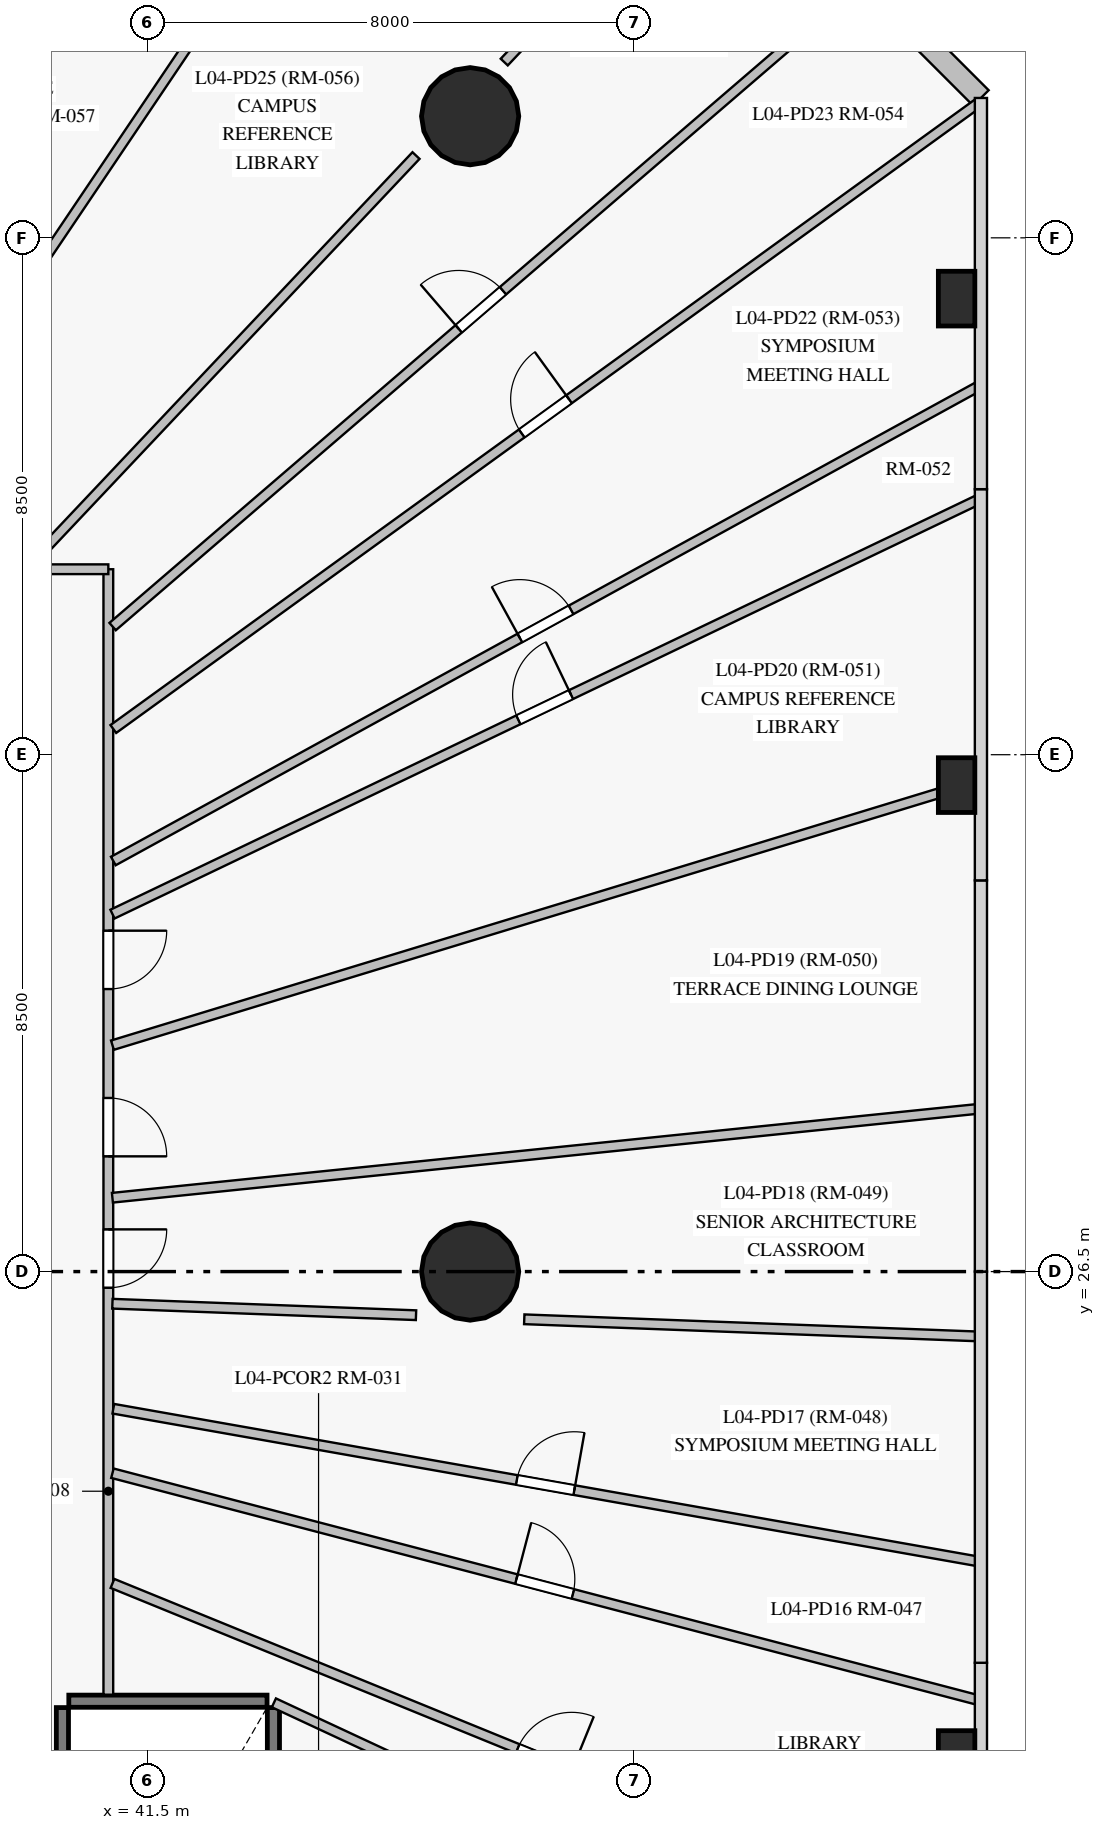
"""IFC4 building model, lengths in metres.
Left out: names, types, materials, properties, quantities, classifications, styles, units other than length and angle.
Written with IfcOpenShell. Run it as: python <this file> out.ifc"""

import sys

from ifc_helpers import new_model, si_unit, direction, frame, frame_2d, origin, origin_with_axes, origin_2d, place, context, subcontext, project, spatial, rectangle, circle, extrude, source, transform, mapped, element, fill, save


model = new_model("IFC4")
c1 = context("Model", 3, precision=1e-05, world=origin(), true_north=direction((0.0, 1.0)))
c2 = subcontext(c1, "Body", "Model", "MODEL_VIEW")
j1 = project(units=[si_unit("LENGTHUNIT", "METRE"), si_unit("PLANEANGLEUNIT", "RADIAN")], contexts=[c1])
p1 = place(None, origin())
s1 = spatial("IfcSite", under=j1, at=p1, CompositionType="ELEMENT")
p2 = place(p1, origin())
s2 = spatial("IfcBuilding", under=s1, at=p2, CompositionType="ELEMENT")
p3 = place(p2, frame((0.0, 0.0, 18.0)))
s3 = spatial("IfcBuildingStorey", under=s2, at=p3, CompositionType="ELEMENT", Elevation=18.0)
m1 = source(origin_with_axes(), c2, "Body", "SweptSolid", [
    extrude(circle(Radius=0.8, at=origin_2d()), origin(), (0.0, 0.0, 1.0), 4.5),
])
for number, where, z_axis, x_axis in (
    (1, (46.8, 26.5, 0.0), (0.0, 0.0, 1.0), (1.0, 0.0, 0.0)),
    (2, (46.8, 45.5, 0.0), (0.0, 0.0, 1.0), (1.0, 0.0, 0.0)),
):
    element("IfcColumn", number, at=place(p3, frame(where, z_axis=z_axis, x_axis=x_axis)), inside=s3, PredefinedType="COLUMN", context=c2, shape_type="MappedRepresentation", body=[
        mapped(m1, transform((0.0, 0.0, 0.0), scale=1.0)),
    ])
m2 = source(origin_with_axes(), c2, "Body", "SweptSolid", [
    extrude(rectangle(XDim=0.6, YDim=0.9, at=origin_2d()), origin(), (0.0, 0.0, 1.0), 4.5),
])
for number, where, z_axis, x_axis in (
    (3, (54.8, 18.5, 0.0), (0.0, 0.0, 1.0), (1.0, 0.0, 0.0)),
    (4, (54.8, 34.5, 0.0), (0.0, 0.0, 1.0), (1.0, 0.0, 0.0)),
    (5, (54.8, 42.5, 0.0), (0.0, 0.0, 1.0), (1.0, 0.0, 0.0)),
):
    element("IfcColumn", number, at=place(p3, frame(where, z_axis=z_axis, x_axis=x_axis)), inside=s3, PredefinedType="PILASTER", context=c2, shape_type="MappedRepresentation", body=[
        mapped(m2, transform((0.0, 0.0, 0.0), scale=1.0)),
    ])
p4 = place(p3, frame((55.2, 45.8, 0.0), z_axis=(0.0, 0.0, 1.0), x_axis=(-0.707106781187, 0.707106781187, 0.0)))
e6 = element("IfcWall", 6, at=p4, inside=s3, PredefinedType="SOLIDWALL", context=c2, shape_type="SweptSolid", body=[
    extrude(rectangle(XDim=2.546, YDim=0.36, at=frame_2d((1.273, 0.0))), origin(), (0.0, 0.0, 1.0), 4.225),
])
p5 = place(p3, frame((40.095, 11.98, 0.0), z_axis=(0.0, 0.0, 1.0), x_axis=(0.0, 1.0, 0.0)))
e7 = element("IfcWall", 7, at=p5, inside=s3, PredefinedType="SHEAR", context=c2, shape_type="SweptSolid", body=[
    extrude(rectangle(XDim=7.35, YDim=0.2, at=frame_2d((3.675, 0.0))), origin(), (0.0, 0.0, 1.0), 4.225),
])
p6 = place(p3, frame((43.565, 11.98, 0.0), z_axis=(0.0, 0.0, 1.0), x_axis=(0.0, 1.0, 0.0)))
e8 = element("IfcWall", 8, at=p6, inside=s3, PredefinedType="SHEAR", context=c2, shape_type="SweptSolid", body=[
    extrude(rectangle(XDim=7.35, YDim=0.2, at=frame_2d((3.675, 0.0))), origin(), (0.0, 0.0, 1.0), 4.225),
])
p7 = place(p6, frame((0.35, 0.0, 0.0)))
e9 = element("IfcOpeningElement", 9, at=p7, cuts=e8, PredefinedType="OPENING", context=c2, shape_type="SweptSolid", body=[
    extrude(rectangle(XDim=1.15, YDim=2.15, at=frame_2d((0.575, 1.075))), frame((0.0, 0.11, 0.0), z_axis=(0.0, -1.0, 0.0), x_axis=(1.0, 0.0, 0.0)), (0.0, 0.0, 1.0), 0.22),
])
p8 = place(p3, frame((40.2, 19.435, 0.0), z_axis=(0.0, 0.0, 1.0), x_axis=(1.0, 0.0, 0.0)))
e10 = element("IfcWall", 10, at=p8, inside=s3, PredefinedType="SHEAR", context=c2, shape_type="SweptSolid", body=[
    extrude(rectangle(XDim=3.26, YDim=0.2, at=frame_2d((1.63, 0.0))), origin(), (0.0, 0.0, 1.0), 4.225),
])
p9 = place(p3, frame((40.85, 38.05, 0.0), z_axis=(0.0, 0.0, 1.0), x_axis=(0.0, -1.0, 0.0)))
e11 = element("IfcWall", 11, at=p9, inside=s3, PredefinedType="PARTITIONING", context=c2, shape_type="SweptSolid", body=[
    extrude(rectangle(XDim=18.508, YDim=0.16, at=frame_2d((9.254, 0.0))), origin(), (0.0, 0.0, 1.0), 2.725),
])
p10 = place(p9, frame((10.856, 0.0, 0.0)))
e12 = element("IfcOpeningElement", 12, at=p10, cuts=e11, PredefinedType="OPENING", context=c2, shape_type="SweptSolid", body=[
    extrude(rectangle(XDim=0.96, YDim=2.15, at=frame_2d((0.48, 1.075))), frame((0.0, 0.09, 0.0), z_axis=(0.0, -1.0, 0.0), x_axis=(1.0, 0.0, 0.0)), (0.0, 0.0, 1.0), 0.18),
])
p11 = place(p9, frame((8.695, 0.0, 0.0)))
e13 = element("IfcOpeningElement", 13, at=p11, cuts=e11, PredefinedType="OPENING", context=c2, shape_type="SweptSolid", body=[
    extrude(rectangle(XDim=0.96, YDim=2.15, at=frame_2d((0.48, 1.075))), frame((0.0, 0.09, 0.0), z_axis=(0.0, -1.0, 0.0), x_axis=(1.0, 0.0, 0.0)), (0.0, 0.0, 1.0), 0.18),
])
p12 = place(p9, frame((5.944, 0.0, 0.0)))
e14 = element("IfcOpeningElement", 14, at=p12, cuts=e11, PredefinedType="OPENING", context=c2, shape_type="SweptSolid", body=[
    extrude(rectangle(XDim=0.96, YDim=2.15, at=frame_2d((0.48, 1.075))), frame((0.0, 0.09, 0.0), z_axis=(0.0, -1.0, 0.0), x_axis=(1.0, 0.0, 0.0)), (0.0, 0.0, 1.0), 0.18),
])
p13 = place(p3, frame((40.932, 35.423, 0.0), z_axis=(0.0, 0.0, 1.0), x_axis=(0.810128766866, 0.586251977477, 0.0)))
e15 = element("IfcWall", 15, at=p13, inside=s3, PredefinedType="PARTITIONING", context=c2, shape_type="SweptSolid", body=[
    extrude(rectangle(XDim=17.566, YDim=0.16, at=frame_2d((8.783, 0.0))), origin(), (0.0, 0.0, 1.0), 4.225),
])
p14 = place(p13, frame((8.291, 0.0, 0.0)))
e16 = element("IfcOpeningElement", 16, at=p14, cuts=e15, PredefinedType="OPENING", context=c2, shape_type="SweptSolid", body=[
    extrude(rectangle(XDim=0.96, YDim=2.15, at=frame_2d((0.48, 1.075))), frame((0.0, 0.09, 0.0), z_axis=(0.0, -1.0, 0.0), x_axis=(1.0, 0.0, 0.0)), (0.0, 0.0, 1.0), 0.18),
])
p15 = place(p3, frame((40.932, 33.252, 0.0), z_axis=(0.0, 0.0, 1.0), x_axis=(0.876735097535, 0.480973563463, 0.0)))
e17 = element("IfcWall", 17, at=p15, inside=s3, PredefinedType="PARTITIONING", context=c2, shape_type="SweptSolid", body=[
    extrude(rectangle(XDim=16.237, YDim=0.16, at=frame_2d((8.118, 0.0))), origin(), (0.0, 0.0, 1.0), 4.225),
])
p16 = place(p15, frame((7.626, 0.0, 0.0)))
e18 = element("IfcOpeningElement", 18, at=p16, cuts=e17, PredefinedType="OPENING", context=c2, shape_type="SweptSolid", body=[
    extrude(rectangle(XDim=0.96, YDim=2.15, at=frame_2d((0.48, 1.075))), frame((0.0, 0.09, 0.0), z_axis=(0.0, -1.0, 0.0), x_axis=(1.0, 0.0, 0.0)), (0.0, 0.0, 1.0), 0.18),
])
p17 = place(p3, frame((40.921, 37.107, 0.0), z_axis=(0.0, 0.0, 1.0), x_axis=(0.758049080964, 0.65219750908, 0.0)))
e19 = element("IfcWall", 19, at=p17, inside=s3, PredefinedType="PARTITIONING", context=c2, shape_type="SweptSolid", body=[
    extrude(rectangle(XDim=16.016, YDim=0.16, at=frame_2d((8.008, 0.0))), origin(), (0.0, 0.0, 1.0), 2.725),
])
p18 = place(p17, frame((7.508, 0.0, 0.0)))
e20 = element("IfcOpeningElement", 20, at=p18, cuts=e19, PredefinedType="OPENING", context=c2, shape_type="SweptSolid", body=[
    extrude(rectangle(XDim=0.96, YDim=2.15, at=frame_2d((0.48, 1.075))), frame((0.0, 0.09, 0.0), z_axis=(0.0, -1.0, 0.0), x_axis=(1.0, 0.0, 0.0)), (0.0, 0.0, 1.0), 0.18),
])
p19 = place(p3, frame((40.918, 32.378, 0.0), z_axis=(0.0, 0.0, 1.0), x_axis=(0.901975422738, 0.431787374499, 0.0)))
e21 = element("IfcWall", 21, at=p19, inside=s3, PredefinedType="PARTITIONING", context=c2, shape_type="SweptSolid", body=[
    extrude(rectangle(XDim=15.799, YDim=0.16, at=frame_2d((7.899, 0.0))), origin(), (0.0, 0.0, 1.0), 4.225),
])
p20 = place(p19, frame((7.399, 0.0, 0.0)))
e22 = element("IfcOpeningElement", 22, at=p20, cuts=e21, PredefinedType="OPENING", context=c2, shape_type="SweptSolid", body=[
    extrude(rectangle(XDim=0.96, YDim=2.15, at=frame_2d((0.48, 1.075))), frame((0.0, 0.09, 0.0), z_axis=(0.0, -1.0, 0.0), x_axis=(1.0, 0.0, 0.0)), (0.0, 0.0, 1.0), 0.18),
])
p21 = place(p3, frame((25.4, 38.05, 0.0), z_axis=(0.0, 0.0, 1.0), x_axis=(1.0, 0.0, 0.0)))
e23 = element("IfcWall", 23, at=p21, inside=s3, PredefinedType="PARTITIONING", context=c2, shape_type="SweptSolid", body=[
    extrude(rectangle(XDim=15.45, YDim=0.16, at=frame_2d((7.725, 0.0))), origin(), (0.0, 0.0, 1.0), 4.225),
])
p22 = place(p21, frame((11.603, 0.0, 0.0)))
e24 = element("IfcOpeningElement", 24, at=p22, cuts=e23, PredefinedType="OPENING", context=c2, shape_type="SweptSolid", body=[
    extrude(rectangle(XDim=0.96, YDim=2.15, at=frame_2d((0.48, 1.075))), frame((0.0, 0.09, 0.0), z_axis=(0.0, -1.0, 0.0), x_axis=(1.0, 0.0, 0.0)), (0.0, 0.0, 1.0), 0.18),
])
p23 = place(p21, frame((9.567, 0.0, 0.0)))
e25 = element("IfcOpeningElement", 25, at=p23, cuts=e23, PredefinedType="OPENING", context=c2, shape_type="SweptSolid", body=[
    extrude(rectangle(XDim=0.96, YDim=2.15, at=frame_2d((0.48, 1.075))), frame((0.0, 0.09, 0.0), z_axis=(0.0, -1.0, 0.0), x_axis=(1.0, 0.0, 0.0)), (0.0, 0.0, 1.0), 0.18),
])
p24 = place(p21, frame((7.25, 0.0, 0.0)))
e26 = element("IfcOpeningElement", 26, at=p24, cuts=e23, PredefinedType="OPENING", context=c2, shape_type="SweptSolid", body=[
    extrude(rectangle(XDim=0.96, YDim=2.15, at=frame_2d((0.48, 1.075))), frame((0.0, 0.09, 0.0), z_axis=(0.0, -1.0, 0.0), x_axis=(1.0, 0.0, 0.0)), (0.0, 0.0, 1.0), 0.18),
])
p25 = place(p21, frame((3.843, 0.0, 0.0)))
e27 = element("IfcOpeningElement", 27, at=p25, cuts=e23, PredefinedType="OPENING", context=c2, shape_type="SweptSolid", body=[
    extrude(rectangle(XDim=0.96, YDim=2.15, at=frame_2d((0.48, 1.075))), frame((0.0, 0.09, 0.0), z_axis=(0.0, -1.0, 0.0), x_axis=(1.0, 0.0, 0.0)), (0.0, 0.0, 1.0), 0.18),
])
p26 = place(p3, frame((40.918, 21.372, 0.0), z_axis=(0.0, 0.0, 1.0), x_axis=(0.92597161246, -0.377593131449, 0.0)))
e28 = element("IfcWall", 28, at=p26, inside=s3, PredefinedType="PARTITIONING", context=c2, shape_type="SweptSolid", body=[
    extrude(rectangle(XDim=15.392, YDim=0.16, at=frame_2d((7.696, 0.0))), origin(), (0.0, 0.0, 1.0), 2.725),
])
p27 = place(p26, frame((7.196, 0.0, 0.0)))
e29 = element("IfcOpeningElement", 29, at=p27, cuts=e28, PredefinedType="OPENING", context=c2, shape_type="SweptSolid", body=[
    extrude(rectangle(XDim=0.96, YDim=2.15, at=frame_2d((0.48, 1.075))), frame((0.0, 0.09, 0.0), z_axis=(0.0, -1.0, 0.0), x_axis=(1.0, 0.0, 0.0)), (0.0, 0.0, 1.0), 0.18),
])
p28 = place(p3, frame((40.918, 30.223, 0.0), z_axis=(0.0, 0.0, 1.0), x_axis=(0.956535282376, 0.291616620873, 0.0)))
e30 = element("IfcWall", 30, at=p28, inside=s3, PredefinedType="PARTITIONING", context=c2, shape_type="SweptSolid", body=[
    extrude(rectangle(XDim=14.902, YDim=0.16, at=frame_2d((7.451, 0.0))), origin(), (0.0, 0.0, 1.0), 3.725),
])
p29 = place(p3, frame((40.917, 23.184, 0.0), z_axis=(0.0, 0.0, 1.0), x_axis=(0.967334122043, -0.253504825064, 0.0)))
e31 = element("IfcWall", 31, at=p29, inside=s3, PredefinedType="PARTITIONING", context=c2, shape_type="SweptSolid", body=[
    extrude(rectangle(XDim=14.737, YDim=0.16, at=frame_2d((7.368, 0.0))), origin(), (0.0, 0.0, 1.0), 3.725),
])
p30 = place(p29, frame((6.868, 0.0, 0.0)))
e32 = element("IfcOpeningElement", 32, at=p30, cuts=e31, PredefinedType="OPENING", context=c2, shape_type="SweptSolid", body=[
    extrude(rectangle(XDim=0.96, YDim=2.15, at=frame_2d((0.48, 1.075))), frame((0.0, 0.09, 0.0), z_axis=(0.0, -1.0, 0.0), x_axis=(1.0, 0.0, 0.0)), (0.0, 0.0, 1.0), 0.18),
])
p31 = place(p3, frame((40.932, 24.244, 0.0), z_axis=(0.0, 0.0, 1.0), x_axis=(0.984776590319, -0.173824817446, 0.0)))
e33 = element("IfcWall", 33, at=p31, inside=s3, PredefinedType="PARTITIONING", context=c2, shape_type="SweptSolid", body=[
    extrude(rectangle(XDim=14.462, YDim=0.16, at=frame_2d((7.231, 0.0))), origin(), (0.0, 0.0, 1.0), 3.725),
])
p32 = place(p31, frame((6.739, 0.0, 0.0)))
e34 = element("IfcOpeningElement", 34, at=p32, cuts=e33, PredefinedType="OPENING", context=c2, shape_type="SweptSolid", body=[
    extrude(rectangle(XDim=0.96, YDim=2.15, at=frame_2d((0.48, 1.075))), frame((0.0, 0.09, 0.0), z_axis=(0.0, -1.0, 0.0), x_axis=(1.0, 0.0, 0.0)), (0.0, 0.0, 1.0), 0.18),
])
p33 = place(p3, frame((40.917, 27.715, 0.0), z_axis=(0.0, 0.0, 1.0), x_axis=(0.994774077244, 0.102100613339, 0.0)))
e35 = element("IfcWall", 35, at=p33, inside=s3, PredefinedType="PARTITIONING", context=c2, shape_type="SweptSolid", body=[
    extrude(rectangle(XDim=14.333, YDim=0.16, at=frame_2d((7.167, 0.0))), origin(), (0.0, 0.0, 1.0), 3.725),
])
p34 = place(p3, frame((43.573, 19.408, 0.0), z_axis=(0.0, 0.0, 1.0), x_axis=(0.906378533885, -0.422466511468, 0.0)))
e36 = element("IfcWall", 36, at=p34, inside=s3, PredefinedType="PARTITIONING", context=c2, shape_type="SweptSolid", body=[
    extrude(rectangle(XDim=12.794, YDim=0.16, at=frame_2d((6.397, 0.0))), origin(), (0.0, 0.0, 1.0), 2.725),
])
p35 = place(p34, frame((5.905, 0.0, 0.0)))
e37 = element("IfcOpeningElement", 37, at=p35, cuts=e36, PredefinedType="OPENING", context=c2, shape_type="SweptSolid", body=[
    extrude(rectangle(XDim=0.96, YDim=2.15, at=frame_2d((0.48, 1.075))), frame((0.0, 0.09, 0.0), z_axis=(0.0, -1.0, 0.0), x_axis=(1.0, 0.0, 0.0)), (0.0, 0.0, 1.0), 0.18),
])
p36 = place(p3, frame((36.412, 38.132, 0.0), z_axis=(0.0, 0.0, 1.0), x_axis=(0.558878812171, 0.829249343266, 0.0)))
e38 = element("IfcWall", 38, at=p36, inside=s3, PredefinedType="PARTITIONING", context=c2, shape_type="SweptSolid", body=[
    extrude(rectangle(XDim=11.374, YDim=0.16, at=frame_2d((5.687, 0.0))), origin(), (0.0, 0.0, 1.0), 4.225),
])
p37 = place(p3, frame((39.554, 38.121, 0.0), z_axis=(0.0, 0.0, 1.0), x_axis=(0.686483369139, 0.727145503937, 0.0)))
e39 = element("IfcWall", 39, at=p37, inside=s3, PredefinedType="PARTITIONING", context=c2, shape_type="SweptSolid", body=[
    extrude(rectangle(XDim=9.258, YDim=0.16, at=frame_2d((4.629, 0.0))), origin(), (0.0, 0.0, 1.0), 2.725),
])
p38 = place(p3, frame((47.69, 25.716, 0.0), z_axis=(0.0, 0.0, 1.0), x_axis=(0.999288692834, -0.0377108522, 0.0)))
e40 = element("IfcWall", 40, at=p38, inside=s3, PredefinedType="PARTITIONING", context=c2, shape_type="SweptSolid", body=[
    extrude(rectangle(XDim=7.49, YDim=0.16, at=frame_2d((3.745, 0.0))), origin(), (0.0, 0.0, 1.0), 3.725),
])
p39 = place(p3, frame((40.917, 25.971, 0.0), z_axis=(0.0, 0.0, 1.0), x_axis=(0.999288275906, -0.037721898636, 0.0)))
e41 = element("IfcWall", 41, at=p39, inside=s3, PredefinedType="PARTITIONING", context=c2, shape_type="SweptSolid", body=[
    extrude(rectangle(XDim=4.997, YDim=0.16, at=frame_2d((2.498, 0.0))), origin(), (0.0, 0.0, 1.0), 2.725),
])
p40 = place(p3, frame((47.361, 46.39, 0.0), z_axis=(0.0, 0.0, 1.0), x_axis=(0.686511880057, 0.727118586299, 0.0)))
e42 = element("IfcWall", 42, at=p40, inside=s3, PredefinedType="PARTITIONING", context=c2, shape_type="SweptSolid", body=[
    extrude(rectangle(XDim=1.605, YDim=0.16, at=frame_2d((0.803, 0.0))), origin(), (0.0, 0.0, 1.0), 4.225),
])
m3 = source(origin_with_axes(), c2, "Body", "SweptSolid", [
    extrude(rectangle(XDim=0.96, YDim=2.15, at=frame_2d((0.48, 1.075))), frame((0.0, 0.025, 0.0), z_axis=(0.0, -1.0, 0.0), x_axis=(1.0, 0.0, 0.0)), (0.0, 0.0, 1.0), 0.05),
])
p41 = place(p27, origin())
e43 = element("IfcDoor", 43, at=p41, inside=s3, OperationType="SINGLE_SWING_RIGHT", PredefinedType="DOOR", context=c2, shape_type="MappedRepresentation", body=[
    mapped(m3, transform((0.0, 0.0, 0.0), scale=1.0)),
])
fill(e29, e43)
p42 = place(p30, origin())
e44 = element("IfcDoor", 44, at=p42, inside=s3, OperationType="SINGLE_SWING_LEFT", PredefinedType="DOOR", context=c2, shape_type="MappedRepresentation", body=[
    mapped(m3, transform((0.0, 0.0, 0.0), scale=1.0)),
])
fill(e32, e44)
p43 = place(p32, origin())
e45 = element("IfcDoor", 45, at=p43, inside=s3, OperationType="SINGLE_SWING_RIGHT", PredefinedType="DOOR", context=c2, shape_type="MappedRepresentation", body=[
    mapped(m3, transform((0.0, 0.0, 0.0), scale=1.0)),
])
fill(e34, e45)
p44 = place(p10, origin())
e46 = element("IfcDoor", 46, at=p44, inside=s3, OperationType="SINGLE_SWING_LEFT", PredefinedType="DOOR", context=c2, shape_type="MappedRepresentation", body=[
    mapped(m3, transform((0.0, 0.0, 0.0), scale=1.0)),
])
fill(e12, e46)
p45 = place(p11, origin())
e47 = element("IfcDoor", 47, at=p45, inside=s3, OperationType="SINGLE_SWING_RIGHT", PredefinedType="DOOR", context=c2, shape_type="MappedRepresentation", body=[
    mapped(m3, transform((0.0, 0.0, 0.0), scale=1.0)),
])
fill(e13, e47)
p46 = place(p12, origin())
e48 = element("IfcDoor", 48, at=p46, inside=s3, OperationType="SINGLE_SWING_LEFT", PredefinedType="DOOR", context=c2, shape_type="MappedRepresentation", body=[
    mapped(m3, transform((0.0, 0.0, 0.0), scale=1.0)),
])
fill(e14, e48)
p47 = place(p20, origin())
e49 = element("IfcDoor", 49, at=p47, inside=s3, OperationType="SINGLE_SWING_RIGHT", PredefinedType="DOOR", context=c2, shape_type="MappedRepresentation", body=[
    mapped(m3, transform((0.0, 0.0, 0.0), scale=1.0)),
])
fill(e22, e49)
p48 = place(p16, origin())
e50 = element("IfcDoor", 50, at=p48, inside=s3, OperationType="SINGLE_SWING_LEFT", PredefinedType="DOOR", context=c2, shape_type="MappedRepresentation", body=[
    mapped(m3, transform((0.0, 0.0, 0.0), scale=1.0)),
])
fill(e18, e50)
p49 = place(p14, origin())
e51 = element("IfcDoor", 51, at=p49, inside=s3, OperationType="SINGLE_SWING_RIGHT", PredefinedType="DOOR", context=c2, shape_type="MappedRepresentation", body=[
    mapped(m3, transform((0.0, 0.0, 0.0), scale=1.0)),
])
fill(e16, e51)
p50 = place(p18, origin())
e52 = element("IfcDoor", 52, at=p50, inside=s3, OperationType="SINGLE_SWING_LEFT", PredefinedType="DOOR", context=c2, shape_type="MappedRepresentation", body=[
    mapped(m3, transform((0.0, 0.0, 0.0), scale=1.0)),
])
fill(e20, e52)
save(model, sys.argv[1])
